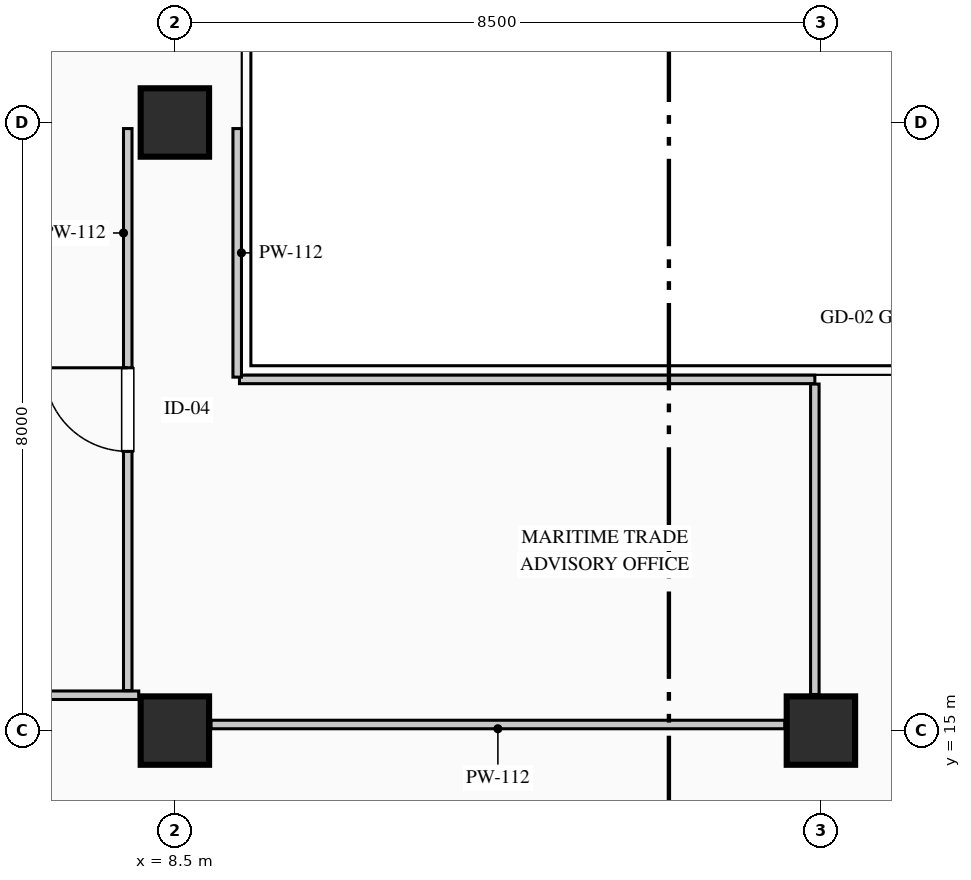
"""IFC4 building model, lengths in metres.
Left out: names, types, materials, properties, quantities, classifications, styles, units other than length and angle.
Written with IfcOpenShell. Run it as: python <this file> out.ifc"""

import sys

from ifc_helpers import new_model, si_unit, direction, frame, frame_2d, origin, origin_2d, place, context, subcontext, project, spatial, rectangle, extrude, element, fill, save


model = new_model("IFC4")
c1 = context("Model", 3, precision=1e-05, world=origin(), true_north=direction((0.0, 1.0)))
c2 = subcontext(c1, "Body", "Model", "MODEL_VIEW")
j1 = project(units=[si_unit("LENGTHUNIT", "METRE"), si_unit("PLANEANGLEUNIT", "RADIAN")], contexts=[c1])
p1 = place(None, origin())
s1 = spatial("IfcSite", under=j1, at=p1, CompositionType="ELEMENT")
p2 = place(p1, origin())
s2 = spatial("IfcBuilding", under=s1, at=p2, CompositionType="ELEMENT")
p3 = place(p2, frame((0.0, 0.0, 191.65)))
s3 = spatial("IfcBuildingStorey", under=s2, at=p3, CompositionType="ELEMENT", Elevation=191.65)
for number, where, z_axis, x_axis in (
    (1, (8.5, 15.0, 0.0), (0.0, 0.0, 1.0), (1.0, 0.0, 0.0)),
    (2, (8.5, 23.0, 0.0), (0.0, 0.0, 1.0), (1.0, 0.0, 0.0)),
    (3, (17.0, 15.0, 0.0), (0.0, 0.0, 1.0), (1.0, 0.0, 0.0)),
):
    element("IfcColumn", number, at=place(p3, frame(where, z_axis=z_axis, x_axis=x_axis)), inside=s3, PredefinedType="COLUMN", context=c2, shape_type="SweptSolid", body=[
        extrude(rectangle(XDim=0.9, YDim=0.9, at=origin_2d()), origin(), (0.0, 0.0, 1.0), 3.95),
    ])
p4 = place(p3, frame((7.469, 4.63, 0.0), z_axis=(0.0, 0.0, 1.0), x_axis=(-0.123515300309, 0.992342667928, 0.0)))
e4 = element("IfcWall", 4, at=p4, inside=s3, PredefinedType="STANDARD", context=c2, shape_type="SweptSolid", body=[
    extrude(rectangle(XDim=37.024, YDim=0.26, at=frame_2d((18.512, 0.0))), origin(), (0.0, 0.0, 1.0), 3.7),
])
p5 = place(p4, frame((11.978, 0.0, 0.9)))
e5 = element("IfcOpeningElement", 5, at=p5, cuts=e4, PredefinedType="OPENING", context=c2, shape_type="SweptSolid", body=[
    extrude(rectangle(XDim=2.7, YDim=2.1, at=frame_2d((1.35, 1.05))), frame((0.0, 0.14, 0.0), z_axis=(0.0, -1.0, 0.0), x_axis=(1.0, 0.0, 0.0)), (0.0, 0.0, 1.0), 0.28),
])
p6 = place(p3, frame((9.35, 19.62, 0.0), z_axis=(0.0, 0.0, 1.0), x_axis=(1.0, 0.0, 0.0)))
e6 = element("IfcWall", 6, at=p6, inside=s3, PredefinedType="PARTITIONING", context=c2, shape_type="SweptSolid", body=[
    extrude(rectangle(XDim=7.57, YDim=0.112, at=frame_2d((3.785, 0.0))), origin(), (0.0, 0.0, 1.0), 3.7),
])
p7 = place(p3, frame((16.92, 19.559, 0.0), z_axis=(0.0, 0.0, 1.0), x_axis=(0.0, -1.0, 0.0)))
e7 = element("IfcWall", 7, at=p7, inside=s3, PredefinedType="PARTITIONING", context=c2, shape_type="SweptSolid", body=[
    extrude(rectangle(XDim=4.084, YDim=0.112, at=frame_2d((2.042, 0.0))), origin(), (0.0, 0.0, 1.0), 3.7),
])
p8 = place(p3, frame((16.525, 15.08, 0.0), z_axis=(0.0, 0.0, 1.0), x_axis=(-1.0, 0.0, 0.0)))
e8 = element("IfcWall", 8, at=p8, inside=s3, PredefinedType="PARTITIONING", context=c2, shape_type="SweptSolid", body=[
    extrude(rectangle(XDim=7.55, YDim=0.112, at=frame_2d((3.775, 0.0))), origin(), (0.0, 0.0, 1.0), 3.085),
])
p9 = place(p3, frame((8.025, 15.465, 0.0), z_axis=(0.0, 0.0, 1.0), x_axis=(-1.0, 0.0, 0.0)))
e9 = element("IfcWall", 9, at=p9, inside=s3, PredefinedType="PARTITIONING", context=c2, shape_type="SweptSolid", body=[
    extrude(rectangle(XDim=1.769, YDim=0.112, at=frame_2d((0.884, 0.0))), origin(), (0.0, 0.0, 1.0), 3.7),
])
p10 = place(p3, frame((7.88, 15.526, 0.0), z_axis=(0.0, 0.0, 1.0), x_axis=(0.0, 1.0, 0.0)))
e10 = element("IfcWall", 10, at=p10, inside=s3, PredefinedType="PARTITIONING", context=c2, shape_type="SweptSolid", body=[
    extrude(rectangle(XDim=7.394, YDim=0.112, at=frame_2d((3.697, 0.0))), origin(), (0.0, 0.0, 1.0), 3.7),
])
p11 = place(p10, frame((3.147, 0.0, 0.0)))
e11 = element("IfcOpeningElement", 11, at=p11, cuts=e10, PredefinedType="OPENING", context=c2, shape_type="SweptSolid", body=[
    extrude(rectangle(XDim=1.1, YDim=2.2, at=frame_2d((0.55, 1.1))), frame((0.0, 0.066, 0.0), z_axis=(0.0, -1.0, 0.0), x_axis=(1.0, 0.0, 0.0)), (0.0, 0.0, 1.0), 0.132),
])
p12 = place(p3, frame((9.32, 22.92, 0.0), z_axis=(0.0, 0.0, 1.0), x_axis=(0.0, -1.0, 0.0)))
e12 = element("IfcWall", 12, at=p12, inside=s3, PredefinedType="PARTITIONING", context=c2, shape_type="SweptSolid", body=[
    extrude(rectangle(XDim=3.27, YDim=0.112, at=frame_2d((1.635, 0.0))), origin(), (0.0, 0.0, 1.0), 3.385),
])
p13 = place(p11, origin())
e13 = element("IfcDoor", 13, at=p13, inside=s3, OperationType="SINGLE_SWING_RIGHT", PredefinedType="DOOR", context=c2, shape_type="SweptSolid", body=[
    extrude(rectangle(XDim=1.1, YDim=2.2, at=frame_2d((0.55, 1.1))), frame((0.0, 0.025, 0.0), z_axis=(0.0, -1.0, 0.0), x_axis=(1.0, 0.0, 0.0)), (0.0, 0.0, 1.0), 0.05),
])
fill(e11, e13)
save(model, sys.argv[1])
